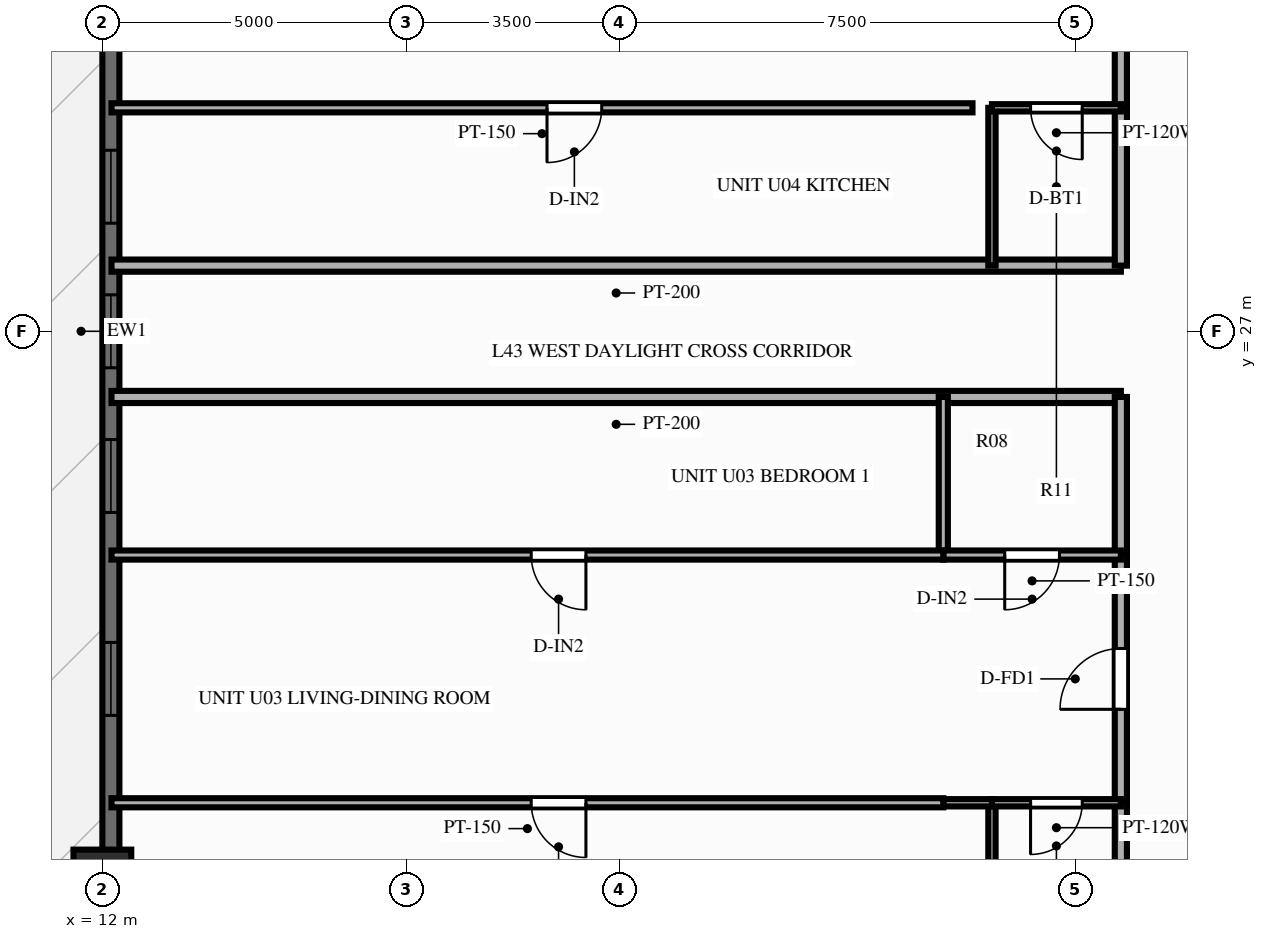
"""IFC4 building model, lengths in metres.
Left out: names, types, materials, properties, quantities, classifications, styles, units other than length and angle.
Written with IfcOpenShell. Run it as: python <this file> out.ifc"""

import sys

from ifc_helpers import new_model, si_unit, direction, frame, frame_2d, origin, origin_2d, place, context, subcontext, project, spatial, rectangle, extrude, source, transform, mapped, element, fill, save


model = new_model("IFC4")
c1 = context("Model", 3, precision=1e-05, world=origin(), true_north=direction((0.0, 1.0)))
c2 = subcontext(c1, "Body", "Model", "MODEL_VIEW")
j1 = project(units=[si_unit("LENGTHUNIT", "METRE"), si_unit("PLANEANGLEUNIT", "RADIAN")], contexts=[c1])
p1 = place(None, origin())
s1 = spatial("IfcSite", under=j1, at=p1, CompositionType="ELEMENT")
p2 = place(p1, origin())
s2 = spatial("IfcBuilding", under=s1, at=p2, CompositionType="ELEMENT")
p3 = place(p2, frame((0.0, 0.0, 135.75)))
s3 = spatial("IfcBuildingStorey", under=s2, at=p3, CompositionType="ELEMENT", Elevation=135.75)
m1 = source(origin(), c2, "Body", "SweptSolid", [
    extrude(rectangle(XDim=0.95, YDim=0.95, at=origin_2d()), origin(), (0.0, 0.0, 1.0), 3.0),
])
p4 = place(p3, frame((12.0, 18.0, 0.0), z_axis=(0.0, 0.0, 1.0), x_axis=(1.0, 0.0, 0.0)))
e1 = element("IfcColumn", 1, at=p4, inside=s3, PredefinedType="COLUMN", context=c2, shape_type="MappedRepresentation", body=[
    mapped(m1, transform((0.0, 0.0, 0.0), scale=1.0)),
])
p5 = place(p3, frame((12.14, 7.2, 0.0), z_axis=(0.0, 0.0, 1.0), x_axis=(0.0, 1.0, 0.0)))
e2 = element("IfcWall", 2, at=p5, inside=s3, PredefinedType="SOLIDWALL", context=c2, shape_type="SweptSolid", body=[
    extrude(rectangle(XDim=39.6, YDim=0.28, at=frame_2d((19.8, 0.0))), origin(), (0.0, 0.0, 1.0), 2.28),
])
p6 = place(p5, frame((0.945, 0.0, 0.25)))
e3 = element("IfcOpeningElement", 3, at=p6, cuts=e2, PredefinedType="OPENING", context=c2, shape_type="SweptSolid", body=[
    extrude(rectangle(XDim=1.2, YDim=1.5, at=frame_2d((0.6, 0.75))), frame((0.0, 0.152, 0.0), z_axis=(0.0, -1.0, 0.0), x_axis=(1.0, 0.0, 0.0)), (0.0, 0.0, 1.0), 0.304),
])
p7 = place(p5, frame((4.213, 0.0, 0.25)))
e4 = element("IfcOpeningElement", 4, at=p7, cuts=e2, PredefinedType="OPENING", context=c2, shape_type="SweptSolid", body=[
    extrude(rectangle(XDim=1.2, YDim=1.5, at=frame_2d((0.6, 0.75))), frame((0.0, 0.152, 0.0), z_axis=(0.0, -1.0, 0.0), x_axis=(1.0, 0.0, 0.0)), (0.0, 0.0, 1.0), 0.304),
])
p8 = place(p5, frame((7.55, 0.0, 0.25)))
e5 = element("IfcOpeningElement", 5, at=p8, cuts=e2, PredefinedType="OPENING", context=c2, shape_type="SweptSolid", body=[
    extrude(rectangle(XDim=1.2, YDim=1.5, at=frame_2d((0.6, 0.75))), frame((0.0, 0.152, 0.0), z_axis=(0.0, -1.0, 0.0), x_axis=(1.0, 0.0, 0.0)), (0.0, 0.0, 1.0), 0.304),
])
p9 = place(p5, frame((13.483, 0.0, 0.25)))
e6 = element("IfcOpeningElement", 6, at=p9, cuts=e2, PredefinedType="OPENING", context=c2, shape_type="SweptSolid", body=[
    extrude(rectangle(XDim=1.2, YDim=1.5, at=frame_2d((0.6, 0.75))), frame((0.0, 0.152, 0.0), z_axis=(0.0, -1.0, 0.0), x_axis=(1.0, 0.0, 0.0)), (0.0, 0.0, 1.0), 0.304),
])
p10 = place(p5, frame((16.82, 0.0, 0.25)))
e7 = element("IfcOpeningElement", 7, at=p10, cuts=e2, PredefinedType="OPENING", context=c2, shape_type="SweptSolid", body=[
    extrude(rectangle(XDim=1.2, YDim=1.5, at=frame_2d((0.6, 0.75))), frame((0.0, 0.152, 0.0), z_axis=(0.0, -1.0, 0.0), x_axis=(1.0, 0.0, 0.0)), (0.0, 0.0, 1.0), 0.304),
])
p11 = place(p5, frame((19.2, 0.0, 0.25)))
e8 = element("IfcOpeningElement", 8, at=p11, cuts=e2, PredefinedType="OPENING", context=c2, shape_type="SweptSolid", body=[
    extrude(rectangle(XDim=1.2, YDim=1.5, at=frame_2d((0.6, 0.75))), frame((0.0, 0.152, 0.0), z_axis=(0.0, -1.0, 0.0), x_axis=(1.0, 0.0, 0.0)), (0.0, 0.0, 1.0), 0.304),
])
p12 = place(p5, frame((21.578, 0.0, 0.25)))
e9 = element("IfcOpeningElement", 9, at=p12, cuts=e2, PredefinedType="OPENING", context=c2, shape_type="SweptSolid", body=[
    extrude(rectangle(XDim=1.2, YDim=1.5, at=frame_2d((0.6, 0.75))), frame((0.0, 0.152, 0.0), z_axis=(0.0, -1.0, 0.0), x_axis=(1.0, 0.0, 0.0)), (0.0, 0.0, 1.0), 0.304),
])
p13 = place(p5, frame((24.713, 0.0, 0.0)))
e10 = element("IfcOpeningElement", 10, at=p13, cuts=e2, PredefinedType="OPENING", context=c2, shape_type="SweptSolid", body=[
    extrude(rectangle(XDim=1.6, YDim=2.15, at=frame_2d((0.8, 1.075))), frame((0.0, 0.152, 0.0), z_axis=(0.0, -1.0, 0.0), x_axis=(1.0, 0.0, 0.0)), (0.0, 0.0, 1.0), 0.304),
])
p14 = place(p5, frame((29.305, 0.0, 0.25)))
e11 = element("IfcOpeningElement", 11, at=p14, cuts=e2, PredefinedType="OPENING", context=c2, shape_type="SweptSolid", body=[
    extrude(rectangle(XDim=0.7, YDim=1.5, at=frame_2d((0.35, 0.75))), frame((0.0, 0.152, 0.0), z_axis=(0.0, -1.0, 0.0), x_axis=(1.0, 0.0, 0.0)), (0.0, 0.0, 1.0), 0.304),
])
p15 = place(p5, frame((30.848, 0.0, 0.25)))
e12 = element("IfcOpeningElement", 12, at=p15, cuts=e2, PredefinedType="OPENING", context=c2, shape_type="SweptSolid", body=[
    extrude(rectangle(XDim=1.2, YDim=1.5, at=frame_2d((0.6, 0.75))), frame((0.0, 0.152, 0.0), z_axis=(0.0, -1.0, 0.0), x_axis=(1.0, 0.0, 0.0)), (0.0, 0.0, 1.0), 0.304),
])
p16 = place(p5, frame((34.183, 0.0, 0.25)))
e13 = element("IfcOpeningElement", 13, at=p16, cuts=e2, PredefinedType="OPENING", context=c2, shape_type="SweptSolid", body=[
    extrude(rectangle(XDim=1.2, YDim=1.5, at=frame_2d((0.6, 0.75))), frame((0.0, 0.152, 0.0), z_axis=(0.0, -1.0, 0.0), x_axis=(1.0, 0.0, 0.0)), (0.0, 0.0, 1.0), 0.304),
])
p17 = place(p5, frame((37.452, 0.0, 0.25)))
e14 = element("IfcOpeningElement", 14, at=p17, cuts=e2, PredefinedType="OPENING", context=c2, shape_type="SweptSolid", body=[
    extrude(rectangle(XDim=1.2, YDim=1.5, at=frame_2d((0.6, 0.75))), frame((0.0, 0.152, 0.0), z_axis=(0.0, -1.0, 0.0), x_axis=(1.0, 0.0, 0.0)), (0.0, 0.0, 1.0), 0.304),
])
p18 = place(p3, frame((28.75, 25.92, 0.0), z_axis=(0.0, 0.0, 1.0), x_axis=(-1.0, 0.0, 0.0)))
e15 = element("IfcWall", 15, at=p18, inside=s3, PredefinedType="PARTITIONING", context=c2, shape_type="SweptSolid", body=[
    extrude(rectangle(XDim=16.6, YDim=0.2, at=frame_2d((8.3, 0.0))), origin(), (0.0, 0.0, 1.0), 2.79),
])
p19 = place(p3, frame((28.75, 16.65, 0.0), z_axis=(0.0, 0.0, 1.0), x_axis=(0.0, 1.0, 0.0)))
e16 = element("IfcWall", 16, at=p19, inside=s3, PredefinedType="PARTITIONING", context=c2, shape_type="SweptSolid", body=[
    extrude(rectangle(XDim=2.596, YDim=0.2, at=frame_2d((1.298, 0.0))), origin(), (0.0, 0.0, 1.0), 2.79),
])
p20 = place(p3, frame((28.75, 19.246, 0.0), z_axis=(0.0, 0.0, 1.0), x_axis=(0.0, 1.0, 0.0)))
e17 = element("IfcWall", 17, at=p20, inside=s3, PredefinedType="PARTITIONING", context=c2, shape_type="SweptSolid", body=[
    extrude(rectangle(XDim=4.074, YDim=0.2, at=frame_2d((2.037, 0.0))), origin(), (0.0, 0.0, 1.0), 2.79),
])
p21 = place(p20, frame((1.537, 0.0, 0.0)))
e18 = element("IfcOpeningElement", 18, at=p21, cuts=e17, PredefinedType="OPENING", context=c2, shape_type="SweptSolid", body=[
    extrude(rectangle(XDim=1.0, YDim=2.15, at=frame_2d((0.5, 1.075))), frame((0.0, 0.112, 0.0), z_axis=(0.0, -1.0, 0.0), x_axis=(1.0, 0.0, 0.0)), (0.0, 0.0, 1.0), 0.224),
])
p22 = place(p3, frame((28.75, 23.32, 0.0), z_axis=(0.0, 0.0, 1.0), x_axis=(0.0, 1.0, 0.0)))
e19 = element("IfcWall", 19, at=p22, inside=s3, PredefinedType="PARTITIONING", context=c2, shape_type="SweptSolid", body=[
    extrude(rectangle(XDim=2.6, YDim=0.2, at=frame_2d((1.3, 0.0))), origin(), (0.0, 0.0, 1.0), 2.79),
])
p23 = place(p3, frame((26.63, 16.65, 0.0), z_axis=(0.0, 0.0, 1.0), x_axis=(0.0, 1.0, 0.0)))
e20 = element("IfcWall", 20, at=p23, inside=s3, PredefinedType="PARTITIONING", context=c2, shape_type="SweptSolid", body=[
    extrude(rectangle(XDim=2.596, YDim=0.12, at=frame_2d((1.298, 0.0))), origin(), (0.0, 0.0, 1.0), 2.79),
])
p24 = place(p3, frame((25.83, 23.32, 0.0), z_axis=(0.0, 0.0, 1.0), x_axis=(0.0, 1.0, 0.0)))
e21 = element("IfcWall", 21, at=p24, inside=s3, PredefinedType="PARTITIONING", context=c2, shape_type="SweptSolid", body=[
    extrude(rectangle(XDim=2.6, YDim=0.15, at=frame_2d((1.3, 0.0))), origin(), (0.0, 0.0, 1.0), 2.79),
])
p25 = place(p3, frame((28.75, 19.246, 0.0), z_axis=(0.0, 0.0, 1.0), x_axis=(-1.0, 0.0, 0.0)))
e22 = element("IfcWall", 22, at=p25, inside=s3, PredefinedType="PARTITIONING", context=c2, shape_type="SweptSolid", body=[
    extrude(rectangle(XDim=2.12, YDim=0.12, at=frame_2d((1.06, 0.0))), origin(), (0.0, 0.0, 1.0), 2.79),
])
p26 = place(p25, frame((0.635, 0.0, 0.0)))
e23 = element("IfcOpeningElement", 23, at=p26, cuts=e22, PredefinedType="OPENING", context=c2, shape_type="SweptSolid", body=[
    extrude(rectangle(XDim=0.85, YDim=2.05, at=frame_2d((0.425, 1.025))), frame((0.0, 0.072, 0.0), z_axis=(0.0, -1.0, 0.0), x_axis=(1.0, 0.0, 0.0)), (0.0, 0.0, 1.0), 0.144),
])
p27 = place(p3, frame((26.63, 19.246, 0.0), z_axis=(0.0, 0.0, 1.0), x_axis=(-1.0, 0.0, 0.0)))
e24 = element("IfcWall", 24, at=p27, inside=s3, PredefinedType="PARTITIONING", context=c2, shape_type="SweptSolid", body=[
    extrude(rectangle(XDim=0.8, YDim=0.12, at=frame_2d((0.4, 0.0))), origin(), (0.0, 0.0, 1.0), 2.79),
])
p28 = place(p3, frame((25.83, 19.246, 0.0), z_axis=(0.0, 0.0, 1.0), x_axis=(-1.0, 0.0, 0.0)))
e25 = element("IfcWall", 25, at=p28, inside=s3, PredefinedType="PARTITIONING", context=c2, shape_type="SweptSolid", body=[
    extrude(rectangle(XDim=13.68, YDim=0.15, at=frame_2d((6.84, 0.0))), origin(), (0.0, 0.0, 1.0), 2.79),
])
p29 = place(p28, frame((5.877, 0.0, 0.0)))
e26 = element("IfcOpeningElement", 26, at=p29, cuts=e25, PredefinedType="OPENING", context=c2, shape_type="SweptSolid", body=[
    extrude(rectangle(XDim=0.9, YDim=2.1, at=frame_2d((0.45, 1.05))), frame((0.0, 0.087, 0.0), z_axis=(0.0, -1.0, 0.0), x_axis=(1.0, 0.0, 0.0)), (0.0, 0.0, 1.0), 0.174),
])
p30 = place(p3, frame((28.75, 23.32, 0.0), z_axis=(0.0, 0.0, 1.0), x_axis=(-1.0, 0.0, 0.0)))
e27 = element("IfcWall", 27, at=p30, inside=s3, PredefinedType="PARTITIONING", context=c2, shape_type="SweptSolid", body=[
    extrude(rectangle(XDim=2.92, YDim=0.15, at=frame_2d((1.46, 0.0))), origin(), (0.0, 0.0, 1.0), 2.79),
])
p31 = place(p30, frame((1.01, 0.0, 0.0)))
e28 = element("IfcOpeningElement", 28, at=p31, cuts=e27, PredefinedType="OPENING", context=c2, shape_type="SweptSolid", body=[
    extrude(rectangle(XDim=0.9, YDim=2.1, at=frame_2d((0.45, 1.05))), frame((0.0, 0.087, 0.0), z_axis=(0.0, -1.0, 0.0), x_axis=(1.0, 0.0, 0.0)), (0.0, 0.0, 1.0), 0.174),
])
p32 = place(p3, frame((25.83, 23.32, 0.0), z_axis=(0.0, 0.0, 1.0), x_axis=(-1.0, 0.0, 0.0)))
e29 = element("IfcWall", 29, at=p32, inside=s3, PredefinedType="PARTITIONING", context=c2, shape_type="SweptSolid", body=[
    extrude(rectangle(XDim=13.68, YDim=0.15, at=frame_2d((6.84, 0.0))), origin(), (0.0, 0.0, 1.0), 2.79),
])
p33 = place(p32, frame((5.877, 0.0, 0.0)))
e30 = element("IfcOpeningElement", 30, at=p33, cuts=e29, PredefinedType="OPENING", context=c2, shape_type="SweptSolid", body=[
    extrude(rectangle(XDim=0.9, YDim=2.1, at=frame_2d((0.45, 1.05))), frame((0.0, 0.087, 0.0), z_axis=(0.0, -1.0, 0.0), x_axis=(1.0, 0.0, 0.0)), (0.0, 0.0, 1.0), 0.174),
])
p34 = place(p3, frame((28.75, 28.08, 0.0), z_axis=(0.0, 0.0, 1.0), x_axis=(-1.0, 0.0, 0.0)))
e31 = element("IfcWall", 31, at=p34, inside=s3, PredefinedType="PARTITIONING", context=c2, shape_type="SweptSolid", body=[
    extrude(rectangle(XDim=16.6, YDim=0.2, at=frame_2d((8.3, 0.0))), origin(), (0.0, 0.0, 1.0), 2.79),
])
p35 = place(p3, frame((28.75, 28.08, 0.0), z_axis=(0.0, 0.0, 1.0), x_axis=(0.0, 1.0, 0.0)))
e32 = element("IfcWall", 32, at=p35, inside=s3, PredefinedType="PARTITIONING", context=c2, shape_type="SweptSolid", body=[
    extrude(rectangle(XDim=2.595, YDim=0.2, at=frame_2d((1.298, 0.0))), origin(), (0.0, 0.0, 1.0), 2.79),
])
p36 = place(p3, frame((28.75, 30.676, 0.0), z_axis=(0.0, 0.0, 1.0), x_axis=(0.0, 1.0, 0.0)))
e33 = element("IfcWall", 33, at=p36, inside=s3, PredefinedType="PARTITIONING", context=c2, shape_type="SweptSolid", body=[
    extrude(rectangle(XDim=4.074, YDim=0.2, at=frame_2d((2.037, 0.0))), origin(), (0.0, 0.0, 1.0), 2.79),
])
p37 = place(p36, frame((1.537, 0.0, 0.0)))
e34 = element("IfcOpeningElement", 34, at=p37, cuts=e33, PredefinedType="OPENING", context=c2, shape_type="SweptSolid", body=[
    extrude(rectangle(XDim=1.0, YDim=2.15, at=frame_2d((0.5, 1.075))), frame((0.0, 0.112, 0.0), z_axis=(0.0, -1.0, 0.0), x_axis=(1.0, 0.0, 0.0)), (0.0, 0.0, 1.0), 0.224),
])
p38 = place(p3, frame((26.63, 28.08, 0.0), z_axis=(0.0, 0.0, 1.0), x_axis=(0.0, 1.0, 0.0)))
e35 = element("IfcWall", 35, at=p38, inside=s3, PredefinedType="PARTITIONING", context=c2, shape_type="SweptSolid", body=[
    extrude(rectangle(XDim=2.595, YDim=0.12, at=frame_2d((1.298, 0.0))), origin(), (0.0, 0.0, 1.0), 2.79),
])
p39 = place(p3, frame((28.75, 30.676, 0.0), z_axis=(0.0, 0.0, 1.0), x_axis=(-1.0, 0.0, 0.0)))
e36 = element("IfcWall", 36, at=p39, inside=s3, PredefinedType="PARTITIONING", context=c2, shape_type="SweptSolid", body=[
    extrude(rectangle(XDim=2.12, YDim=0.12, at=frame_2d((1.06, 0.0))), origin(), (0.0, 0.0, 1.0), 2.79),
])
p40 = place(p39, frame((0.635, 0.0, 0.0)))
e37 = element("IfcOpeningElement", 37, at=p40, cuts=e36, PredefinedType="OPENING", context=c2, shape_type="SweptSolid", body=[
    extrude(rectangle(XDim=0.85, YDim=2.05, at=frame_2d((0.425, 1.025))), frame((0.0, 0.072, 0.0), z_axis=(0.0, -1.0, 0.0), x_axis=(1.0, 0.0, 0.0)), (0.0, 0.0, 1.0), 0.144),
])
p41 = place(p3, frame((26.31, 30.676, 0.0), z_axis=(0.0, 0.0, 1.0), x_axis=(-1.0, 0.0, 0.0)))
e38 = element("IfcWall", 38, at=p41, inside=s3, PredefinedType="PARTITIONING", context=c2, shape_type="SweptSolid", body=[
    extrude(rectangle(XDim=14.16, YDim=0.15, at=frame_2d((7.08, 0.0))), origin(), (0.0, 0.0, 1.0), 2.79),
])
p42 = place(p41, frame((6.097, 0.0, 0.0)))
e39 = element("IfcOpeningElement", 39, at=p42, cuts=e38, PredefinedType="OPENING", context=c2, shape_type="SweptSolid", body=[
    extrude(rectangle(XDim=0.9, YDim=2.1, at=frame_2d((0.45, 1.05))), frame((0.0, 0.087, 0.0), z_axis=(0.0, -1.0, 0.0), x_axis=(1.0, 0.0, 0.0)), (0.0, 0.0, 1.0), 0.174),
])
m2 = source(origin(), c2, "Body", "SweptSolid", [
    extrude(rectangle(XDim=1.2, YDim=1.5, at=frame_2d((0.6, 0.75))), frame((0.0, 0.03, 0.0), z_axis=(0.0, -1.0, 0.0), x_axis=(1.0, 0.0, 0.0)), (0.0, 0.0, 1.0), 0.06),
])
p43 = place(p9, origin())
e40 = element("IfcWindow", 40, at=p43, inside=s3, PartitioningType="SINGLE_PANEL", PredefinedType="WINDOW", context=c2, shape_type="MappedRepresentation", body=[
    mapped(m2, transform((0.0, 0.0, 0.0), scale=1.0)),
])
fill(e6, e40)
p44 = place(p10, origin())
e41 = element("IfcWindow", 41, at=p44, inside=s3, PartitioningType="SINGLE_PANEL", PredefinedType="WINDOW", context=c2, shape_type="MappedRepresentation", body=[
    mapped(m2, transform((0.0, 0.0, 0.0), scale=1.0)),
])
fill(e7, e41)
p45 = place(p11, origin())
e42 = element("IfcWindow", 42, at=p45, inside=s3, PartitioningType="SINGLE_PANEL", PredefinedType="WINDOW", context=c2, shape_type="MappedRepresentation", body=[
    mapped(m2, transform((0.0, 0.0, 0.0), scale=1.0)),
])
fill(e8, e42)
p46 = place(p12, origin())
e43 = element("IfcWindow", 43, at=p46, inside=s3, PartitioningType="SINGLE_PANEL", PredefinedType="WINDOW", context=c2, shape_type="MappedRepresentation", body=[
    mapped(m2, transform((0.0, 0.0, 0.0), scale=1.0)),
])
fill(e9, e43)
m3 = source(origin(), c2, "Body", "SweptSolid", [
    extrude(rectangle(XDim=1.0, YDim=2.15, at=frame_2d((0.5, 1.075))), frame((0.0, 0.025, 0.0), z_axis=(0.0, -1.0, 0.0), x_axis=(1.0, 0.0, 0.0)), (0.0, 0.0, 1.0), 0.05),
])
p47 = place(p21, origin())
e44 = element("IfcDoor", 44, at=p47, inside=s3, OperationType="SINGLE_SWING_LEFT", PredefinedType="DOOR", context=c2, shape_type="MappedRepresentation", body=[
    mapped(m3, transform((0.0, 0.0, 0.0), scale=1.0)),
])
fill(e18, e44)
m4 = source(origin(), c2, "Body", "SweptSolid", [
    extrude(rectangle(XDim=0.85, YDim=2.05, at=frame_2d((0.425, 1.025))), frame((0.0, 0.025, 0.0), z_axis=(0.0, -1.0, 0.0), x_axis=(1.0, 0.0, 0.0)), (0.0, 0.0, 1.0), 0.05),
])
p48 = place(p26, origin())
e45 = element("IfcDoor", 45, at=p48, inside=s3, OperationType="SINGLE_SWING_RIGHT", PredefinedType="DOOR", context=c2, shape_type="MappedRepresentation", body=[
    mapped(m4, transform((0.0, 0.0, 0.0), scale=1.0)),
])
fill(e23, e45)
m5 = source(origin(), c2, "Body", "SweptSolid", [
    extrude(rectangle(XDim=0.9, YDim=2.1, at=frame_2d((0.45, 1.05))), frame((0.0, 0.025, 0.0), z_axis=(0.0, -1.0, 0.0), x_axis=(1.0, 0.0, 0.0)), (0.0, 0.0, 1.0), 0.05),
])
p49 = place(p29, origin())
e46 = element("IfcDoor", 46, at=p49, inside=s3, OperationType="SINGLE_SWING_LEFT", PredefinedType="DOOR", context=c2, shape_type="MappedRepresentation", body=[
    mapped(m5, transform((0.0, 0.0, 0.0), scale=1.0)),
])
fill(e26, e46)
p50 = place(p31, origin())
e47 = element("IfcDoor", 47, at=p50, inside=s3, OperationType="SINGLE_SWING_RIGHT", PredefinedType="DOOR", context=c2, shape_type="MappedRepresentation", body=[
    mapped(m5, transform((0.0, 0.0, 0.0), scale=1.0)),
])
fill(e28, e47)
p51 = place(p33, origin())
e48 = element("IfcDoor", 48, at=p51, inside=s3, OperationType="SINGLE_SWING_LEFT", PredefinedType="DOOR", context=c2, shape_type="MappedRepresentation", body=[
    mapped(m5, transform((0.0, 0.0, 0.0), scale=1.0)),
])
fill(e30, e48)
p52 = place(p40, origin())
e49 = element("IfcDoor", 49, at=p52, inside=s3, OperationType="SINGLE_SWING_LEFT", PredefinedType="DOOR", context=c2, shape_type="MappedRepresentation", body=[
    mapped(m4, transform((0.0, 0.0, 0.0), scale=1.0)),
])
fill(e37, e49)
p53 = place(p42, origin())
e50 = element("IfcDoor", 50, at=p53, inside=s3, OperationType="SINGLE_SWING_RIGHT", PredefinedType="DOOR", context=c2, shape_type="MappedRepresentation", body=[
    mapped(m5, transform((0.0, 0.0, 0.0), scale=1.0)),
])
fill(e39, e50)
save(model, sys.argv[1])
